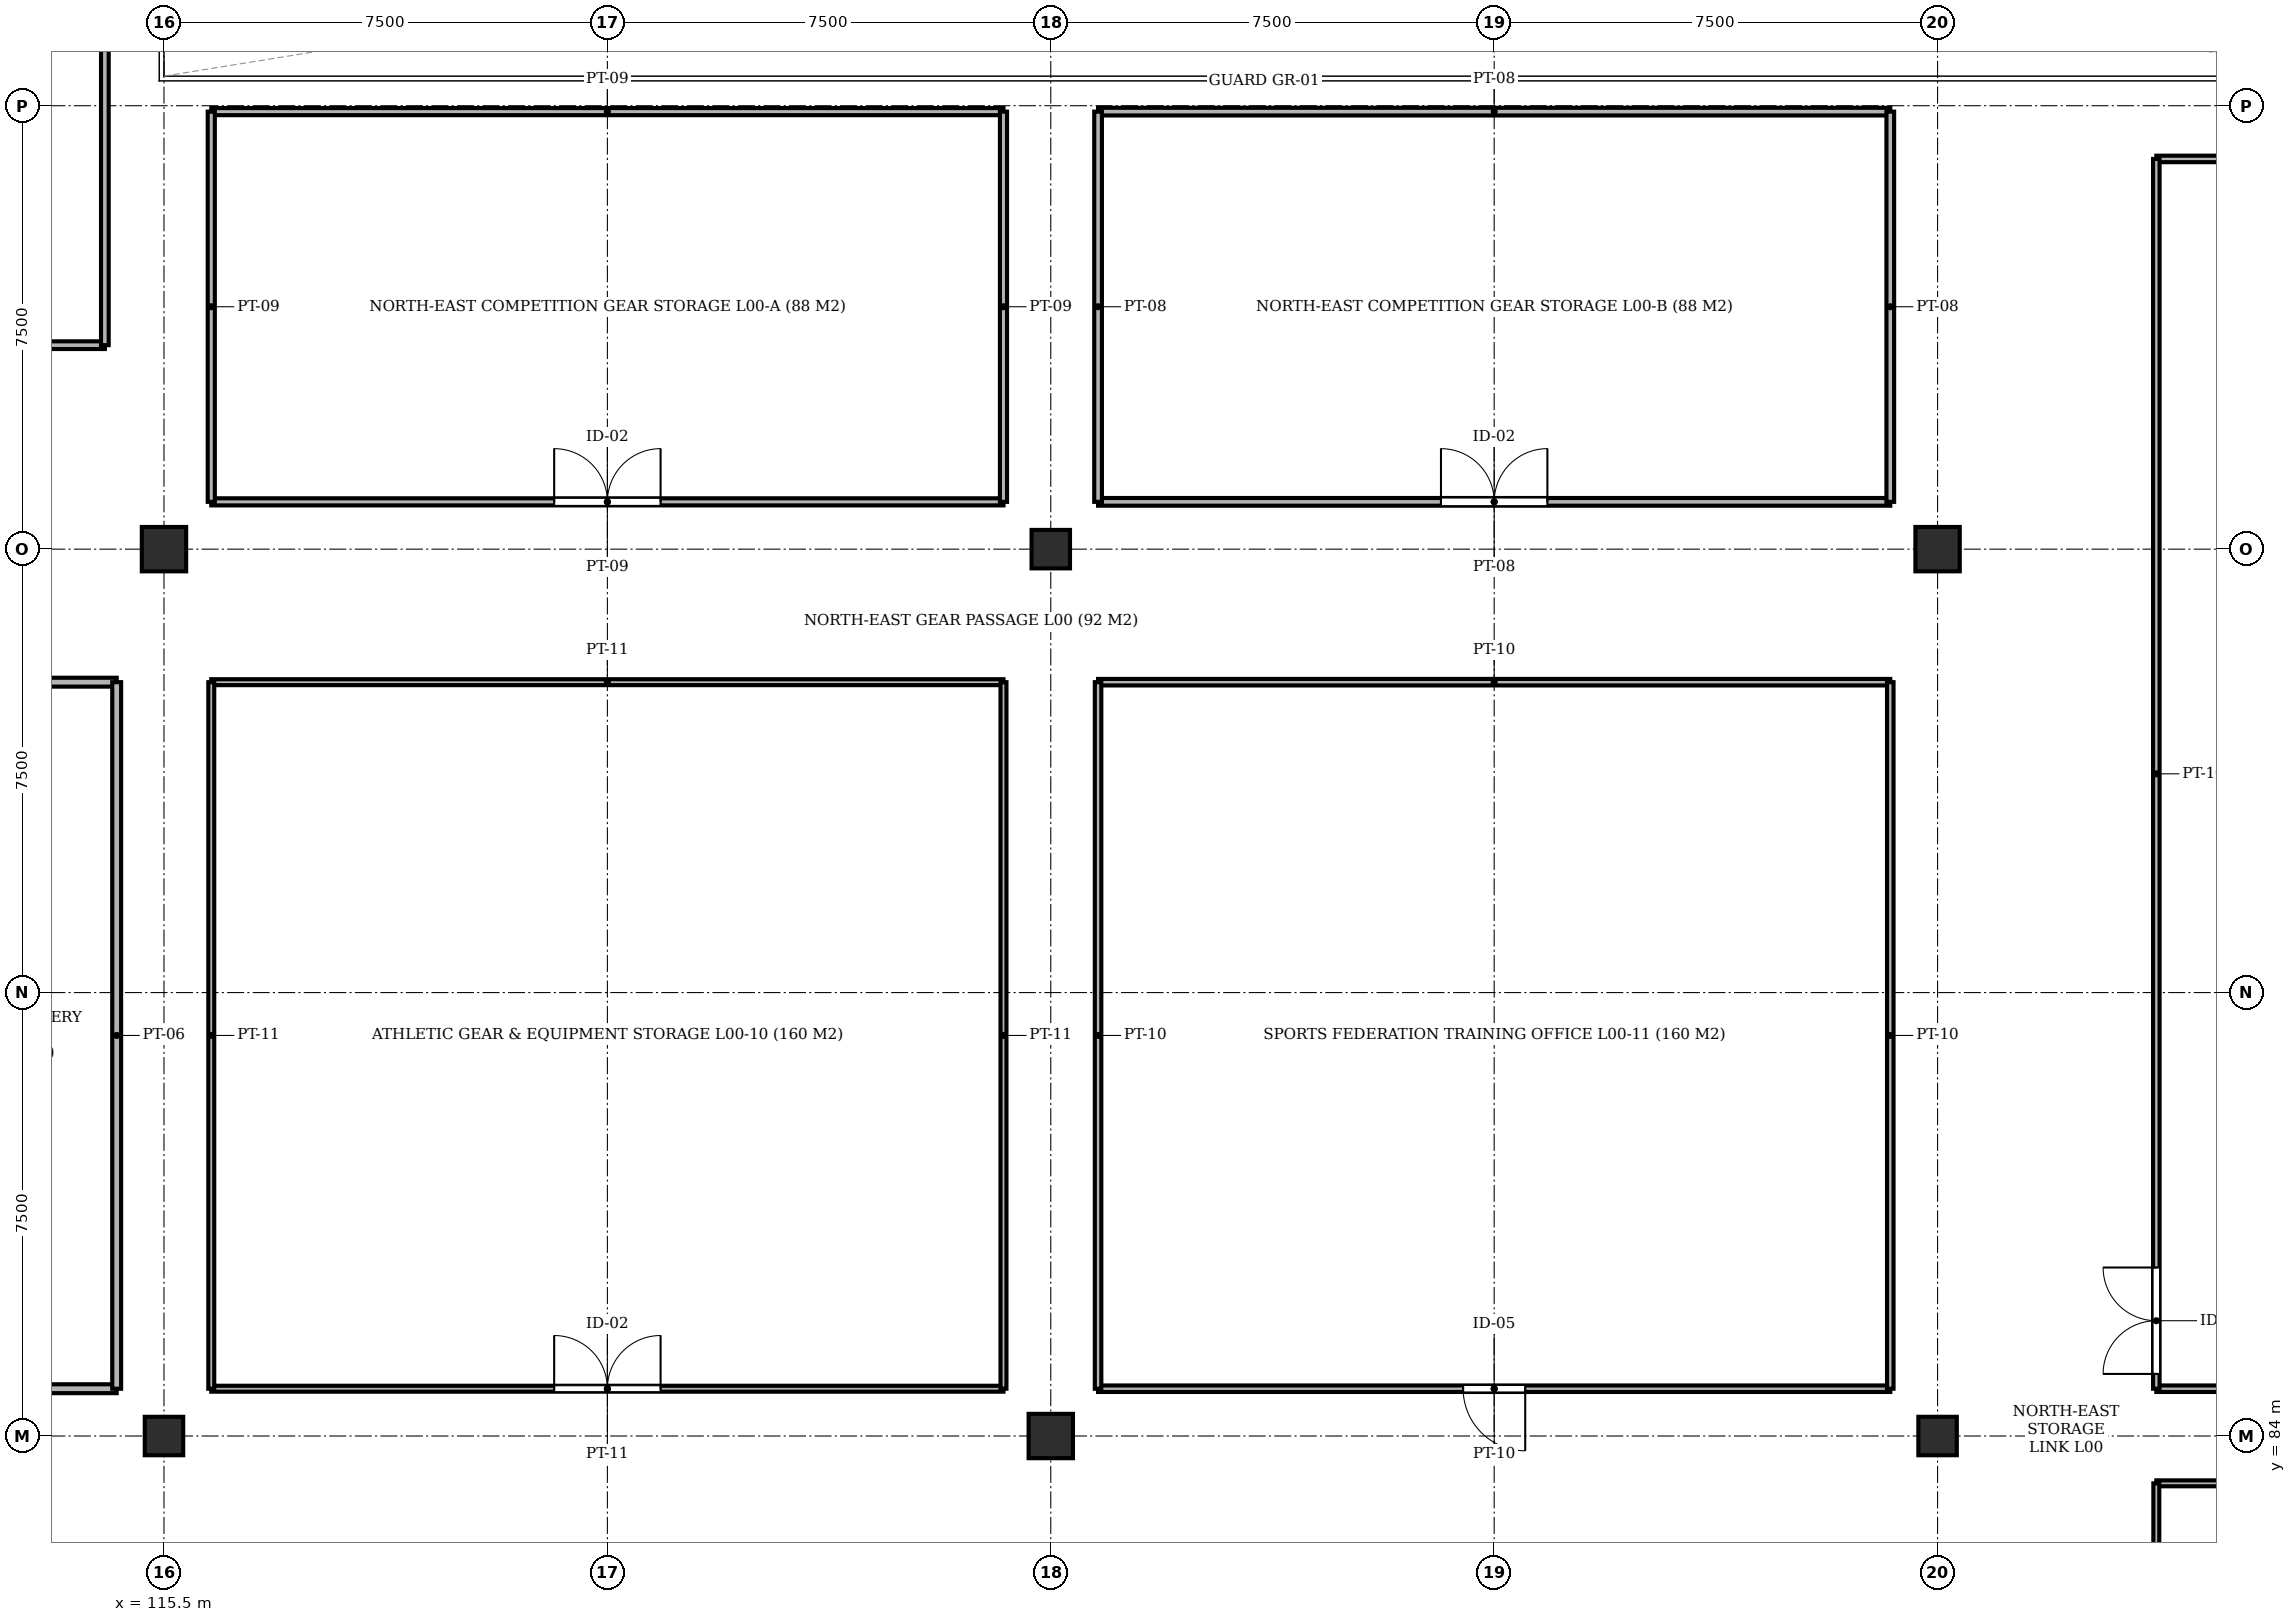
"""IFC4 building model, lengths in metres.
Left out: names, types, materials, properties, quantities, classifications, styles, units other than length and angle.
Written with IfcOpenShell. Run it as: python <this file> out.ifc"""

import sys

from ifc_helpers import new_model, si_unit, direction, frame, frame_2d, origin, origin_2d, place, context, subcontext, project, spatial, rectangle, extrude, element, fill, save


model = new_model("IFC4")
c1 = context("Model", 3, precision=1e-05, world=origin(), true_north=direction((0.0, 1.0)))
c2 = subcontext(c1, "Body", "Model", "MODEL_VIEW")
j1 = project(units=[si_unit("LENGTHUNIT", "METRE"), si_unit("PLANEANGLEUNIT", "RADIAN")], contexts=[c1])
p1 = place(None, origin())
s1 = spatial("IfcSite", under=j1, at=p1, CompositionType="ELEMENT")
p2 = place(p1, origin())
s2 = spatial("IfcBuilding", under=s1, at=p2, CompositionType="ELEMENT")
p3 = place(p2, origin())
s3 = spatial("IfcBuildingStorey", under=s2, at=p3, CompositionType="ELEMENT", Elevation=0.0)
p4 = place(p3, frame((115.5, 84.0, -0.35), z_axis=(0.0, 0.0, 1.0), x_axis=(1.0, 0.0, 0.0)))
e1 = element("IfcColumn", 1, at=p4, inside=s3, PredefinedType="COLUMN", context=c2, shape_type="SweptSolid", body=[
    extrude(rectangle(XDim=0.65, YDim=0.65, at=origin_2d()), origin(), (0.0, 0.0, 1.0), 4.65),
])
for number, where, z_axis, x_axis in (
    (2, (115.5, 99.0, -0.35), (0.0, 0.0, 1.0), (1.0, 0.0, 0.0)),
    (3, (130.5, 84.0, -0.35), (0.0, 0.0, 1.0), (1.0, 0.0, 0.0)),
):
    element("IfcColumn", number, at=place(p3, frame(where, z_axis=z_axis, x_axis=x_axis)), inside=s3, PredefinedType="COLUMN", context=c2, shape_type="SweptSolid", body=[
        extrude(rectangle(XDim=0.75, YDim=0.75, at=origin_2d()), origin(), (0.0, 0.0, 1.0), 4.65),
    ])
for number, where, z_axis, x_axis in (
    (4, (130.5, 99.0, -0.35), (0.0, 0.0, 1.0), (1.0, 0.0, 0.0)),
    (5, (145.5, 84.0, -0.35), (0.0, 0.0, 1.0), (1.0, 0.0, 0.0)),
):
    element("IfcColumn", number, at=place(p3, frame(where, z_axis=z_axis, x_axis=x_axis)), inside=s3, PredefinedType="COLUMN", context=c2, shape_type="SweptSolid", body=[
        extrude(rectangle(XDim=0.65, YDim=0.65, at=origin_2d()), origin(), (0.0, 0.0, 1.0), 4.65),
    ])
p5 = place(p3, frame((145.5, 99.0, -0.35), z_axis=(0.0, 0.0, 1.0), x_axis=(1.0, 0.0, 0.0)))
e6 = element("IfcColumn", 6, at=p5, inside=s3, PredefinedType="COLUMN", context=c2, shape_type="SweptSolid", body=[
    extrude(rectangle(XDim=0.75, YDim=0.75, at=origin_2d()), origin(), (0.0, 0.0, 1.0), 4.65),
])
p6 = place(p3, frame((108.8, 84.8, 0.0), z_axis=(0.0, 0.0, 1.0), x_axis=(1.0, 0.0, 0.0)))
e7 = element("IfcWall", 7, at=p6, inside=s3, PredefinedType="PARTITIONING", context=c2, shape_type="SweptSolid", body=[
    extrude(rectangle(XDim=5.9, YDim=0.15, at=frame_2d((2.95, 0.0))), origin(), (0.0, 0.0, 1.0), 3.88),
])
p7 = place(p6, frame((2.4, 0.0, 0.0)))
e8 = element("IfcOpeningElement", 8, at=p7, cuts=e7, PredefinedType="OPENING", context=c2, shape_type="SweptSolid", body=[
    extrude(rectangle(XDim=1.1, YDim=2.15, at=frame_2d((0.55, 1.075))), frame((0.0, 0.087, 0.0), z_axis=(0.0, -1.0, 0.0), x_axis=(1.0, 0.0, 0.0)), (0.0, 0.0, 1.0), 0.174),
])
p8 = place(p3, frame((108.8, 96.75, 0.0), z_axis=(0.0, 0.0, 1.0), x_axis=(1.0, 0.0, 0.0)))
e9 = element("IfcWall", 9, at=p8, inside=s3, PredefinedType="PARTITIONING", context=c2, shape_type="SweptSolid", body=[
    extrude(rectangle(XDim=5.9, YDim=0.15, at=frame_2d((2.95, 0.0))), origin(), (0.0, 0.0, 1.0), 3.88),
])
p9 = place(p3, frame((114.7, 84.8, 0.0), z_axis=(0.0, 0.0, 1.0), x_axis=(0.0, 1.0, 0.0)))
e10 = element("IfcWall", 10, at=p9, inside=s3, PredefinedType="PARTITIONING", context=c2, shape_type="SweptSolid", body=[
    extrude(rectangle(XDim=11.95, YDim=0.15, at=frame_2d((5.975, 0.0))), origin(), (0.0, 0.0, 1.0), 3.88),
])
p10 = place(p3, frame((116.3, 84.8, 0.0), z_axis=(0.0, 0.0, 1.0), x_axis=(1.0, 0.0, 0.0)))
e11 = element("IfcWall", 11, at=p10, inside=s3, PredefinedType="PARTITIONING", context=c2, shape_type="SweptSolid", body=[
    extrude(rectangle(XDim=13.4, YDim=0.1, at=frame_2d((6.7, 0.0))), origin(), (0.0, 0.0, 1.0), 3.88),
])
p11 = place(p10, frame((5.8, 0.0, 0.0)))
e12 = element("IfcOpeningElement", 12, at=p11, cuts=e11, PredefinedType="OPENING", context=c2, shape_type="SweptSolid", body=[
    extrude(rectangle(XDim=1.8, YDim=2.25, at=frame_2d((0.9, 1.125))), frame((0.0, 0.062, 0.0), z_axis=(0.0, -1.0, 0.0), x_axis=(1.0, 0.0, 0.0)), (0.0, 0.0, 1.0), 0.124),
])
p12 = place(p3, frame((116.3, 96.75, 0.0), z_axis=(0.0, 0.0, 1.0), x_axis=(1.0, 0.0, 0.0)))
e13 = element("IfcWall", 13, at=p12, inside=s3, PredefinedType="PARTITIONING", context=c2, shape_type="SweptSolid", body=[
    extrude(rectangle(XDim=13.4, YDim=0.1, at=frame_2d((6.7, 0.0))), origin(), (0.0, 0.0, 1.0), 3.88),
])
for number, where, z_axis, x_axis in (
    (14, (116.3, 84.8, 0.0), (0.0, 0.0, 1.0), (0.0, 1.0, 0.0)),
    (15, (129.7, 84.8, 0.0), (0.0, 0.0, 1.0), (0.0, 1.0, 0.0)),
):
    element("IfcWall", number, at=place(p3, frame(where, z_axis=z_axis, x_axis=x_axis)), inside=s3, PredefinedType="PARTITIONING", context=c2, shape_type="SweptSolid", body=[
        extrude(rectangle(XDim=11.95, YDim=0.1, at=frame_2d((5.975, 0.0))), origin(), (0.0, 0.0, 1.0), 3.88),
    ])
p13 = place(p3, frame((131.3, 84.8, 0.0), z_axis=(0.0, 0.0, 1.0), x_axis=(1.0, 0.0, 0.0)))
e16 = element("IfcWall", 16, at=p13, inside=s3, PredefinedType="PARTITIONING", context=c2, shape_type="SweptSolid", body=[
    extrude(rectangle(XDim=13.4, YDim=0.11, at=frame_2d((6.7, 0.0))), origin(), (0.0, 0.0, 1.0), 3.88),
])
p14 = place(p13, frame((6.175, 0.0, 0.0)))
e17 = element("IfcOpeningElement", 17, at=p14, cuts=e16, PredefinedType="OPENING", context=c2, shape_type="SweptSolid", body=[
    extrude(rectangle(XDim=1.05, YDim=2.15, at=frame_2d((0.525, 1.075))), frame((0.0, 0.067, 0.0), z_axis=(0.0, -1.0, 0.0), x_axis=(1.0, 0.0, 0.0)), (0.0, 0.0, 1.0), 0.134),
])
p15 = place(p3, frame((131.3, 96.75, 0.0), z_axis=(0.0, 0.0, 1.0), x_axis=(1.0, 0.0, 0.0)))
e18 = element("IfcWall", 18, at=p15, inside=s3, PredefinedType="PARTITIONING", context=c2, shape_type="SweptSolid", body=[
    extrude(rectangle(XDim=13.4, YDim=0.11, at=frame_2d((6.7, 0.0))), origin(), (0.0, 0.0, 1.0), 3.88),
])
for number, where, z_axis, x_axis in (
    (19, (131.3, 84.8, 0.0), (0.0, 0.0, 1.0), (0.0, 1.0, 0.0)),
    (20, (144.7, 84.8, 0.0), (0.0, 0.0, 1.0), (0.0, 1.0, 0.0)),
):
    element("IfcWall", number, at=place(p3, frame(where, z_axis=z_axis, x_axis=x_axis)), inside=s3, PredefinedType="PARTITIONING", context=c2, shape_type="SweptSolid", body=[
        extrude(rectangle(XDim=11.95, YDim=0.11, at=frame_2d((5.975, 0.0))), origin(), (0.0, 0.0, 1.0), 3.88),
    ])
p16 = place(p3, frame((108.8, 102.45, 0.0), z_axis=(0.0, 0.0, 1.0), x_axis=(1.0, 0.0, 0.0)))
e21 = element("IfcWall", 21, at=p16, inside=s3, PredefinedType="PARTITIONING", context=c2, shape_type="SweptSolid", body=[
    extrude(rectangle(XDim=5.7, YDim=0.13, at=frame_2d((2.85, 0.0))), origin(), (0.0, 0.0, 1.0), 3.88),
])
p17 = place(p16, frame((1.95, 0.0, 0.0)))
e22 = element("IfcOpeningElement", 22, at=p17, cuts=e21, PredefinedType="OPENING", context=c2, shape_type="SweptSolid", body=[
    extrude(rectangle(XDim=1.8, YDim=2.25, at=frame_2d((0.9, 1.125))), frame((0.0, 0.077, 0.0), z_axis=(0.0, -1.0, 0.0), x_axis=(1.0, 0.0, 0.0)), (0.0, 0.0, 1.0), 0.154),
])
p18 = place(p3, frame((114.5, 102.45, 0.0), z_axis=(0.0, 0.0, 1.0), x_axis=(0.0, 1.0, 0.0)))
e23 = element("IfcWall", 23, at=p18, inside=s3, PredefinedType="PARTITIONING", context=c2, shape_type="SweptSolid", body=[
    extrude(rectangle(XDim=10.65, YDim=0.13, at=frame_2d((5.325, 0.0))), origin(), (0.0, 0.0, 1.0), 3.88),
])
p19 = place(p3, frame((149.2, 83.2, 0.0), z_axis=(0.0, 0.0, 1.0), x_axis=(1.0, 0.0, 0.0)))
e24 = element("IfcWall", 24, at=p19, inside=s3, PredefinedType="PARTITIONING", context=c2, shape_type="SweptSolid", body=[
    extrude(rectangle(XDim=14.6, YDim=0.1, at=frame_2d((7.3, 0.0))), origin(), (0.0, 0.0, 1.0), 3.88),
])
p20 = place(p3, frame((149.2, 70.4, 0.0), z_axis=(0.0, 0.0, 1.0), x_axis=(0.0, 1.0, 0.0)))
e25 = element("IfcWall", 25, at=p20, inside=s3, PredefinedType="PARTITIONING", context=c2, shape_type="SweptSolid", body=[
    extrude(rectangle(XDim=12.8, YDim=0.1, at=frame_2d((6.4, 0.0))), origin(), (0.0, 0.0, 1.0), 3.88),
])
p21 = place(p20, frame((5.5, 0.0, 0.0)))
e26 = element("IfcOpeningElement", 26, at=p21, cuts=e25, PredefinedType="OPENING", context=c2, shape_type="SweptSolid", body=[
    extrude(rectangle(XDim=1.8, YDim=2.25, at=frame_2d((0.9, 1.125))), frame((0.0, 0.062, 0.0), z_axis=(0.0, -1.0, 0.0), x_axis=(1.0, 0.0, 0.0)), (0.0, 0.0, 1.0), 0.124),
])
for number, where, z_axis, x_axis in (
    (27, (149.2, 84.8, 0.0), (0.0, 0.0, 1.0), (1.0, 0.0, 0.0)),
    (28, (149.2, 105.6, 0.0), (0.0, 0.0, 1.0), (1.0, 0.0, 0.0)),
):
    element("IfcWall", number, at=place(p3, frame(where, z_axis=z_axis, x_axis=x_axis)), inside=s3, PredefinedType="PARTITIONING", context=c2, shape_type="SweptSolid", body=[
        extrude(rectangle(XDim=14.6, YDim=0.11, at=frame_2d((7.3, 0.0))), origin(), (0.0, 0.0, 1.0), 3.88),
    ])
p22 = place(p3, frame((149.2, 84.8, 0.0), z_axis=(0.0, 0.0, 1.0), x_axis=(0.0, 1.0, 0.0)))
e29 = element("IfcWall", 29, at=p22, inside=s3, PredefinedType="PARTITIONING", context=c2, shape_type="SweptSolid", body=[
    extrude(rectangle(XDim=20.8, YDim=0.11, at=frame_2d((10.4, 0.0))), origin(), (0.0, 0.0, 1.0), 3.88),
])
p23 = place(p22, frame((0.25, 0.0, 0.0)))
e30 = element("IfcOpeningElement", 30, at=p23, cuts=e29, PredefinedType="OPENING", context=c2, shape_type="SweptSolid", body=[
    extrude(rectangle(XDim=1.8, YDim=2.25, at=frame_2d((0.9, 1.125))), frame((0.0, 0.067, 0.0), z_axis=(0.0, -1.0, 0.0), x_axis=(1.0, 0.0, 0.0)), (0.0, 0.0, 1.0), 0.134),
])
p24 = place(p3, frame((116.3, 99.8, 0.0), z_axis=(0.0, 0.0, 1.0), x_axis=(1.0, 0.0, 0.0)))
e31 = element("IfcWall", 31, at=p24, inside=s3, PredefinedType="PARTITIONING", context=c2, shape_type="SweptSolid", body=[
    extrude(rectangle(XDim=13.4, YDim=0.12, at=frame_2d((6.7, 0.0))), origin(), (0.0, 0.0, 1.0), 3.88),
])
p25 = place(p24, frame((5.8, 0.0, 0.0)))
e32 = element("IfcOpeningElement", 32, at=p25, cuts=e31, PredefinedType="OPENING", context=c2, shape_type="SweptSolid", body=[
    extrude(rectangle(XDim=1.8, YDim=2.25, at=frame_2d((0.9, 1.125))), frame((0.0, 0.072, 0.0), z_axis=(0.0, -1.0, 0.0), x_axis=(1.0, 0.0, 0.0)), (0.0, 0.0, 1.0), 0.144),
])
p26 = place(p3, frame((116.3, 106.4, 0.0), z_axis=(0.0, 0.0, 1.0), x_axis=(1.0, 0.0, 0.0)))
e33 = element("IfcWall", 33, at=p26, inside=s3, PredefinedType="PARTITIONING", context=c2, shape_type="SweptSolid", body=[
    extrude(rectangle(XDim=13.4, YDim=0.12, at=frame_2d((6.7, 0.0))), origin(), (0.0, 0.0, 1.0), 3.88),
])
for number, where, z_axis, x_axis in (
    (34, (116.3, 99.8, 0.0), (0.0, 0.0, 1.0), (0.0, 1.0, 0.0)),
    (35, (129.7, 99.8, 0.0), (0.0, 0.0, 1.0), (0.0, 1.0, 0.0)),
):
    element("IfcWall", number, at=place(p3, frame(where, z_axis=z_axis, x_axis=x_axis)), inside=s3, PredefinedType="PARTITIONING", context=c2, shape_type="SweptSolid", body=[
        extrude(rectangle(XDim=6.6, YDim=0.12, at=frame_2d((3.3, 0.0))), origin(), (0.0, 0.0, 1.0), 3.88),
    ])
p27 = place(p3, frame((131.3, 99.8, 0.0), z_axis=(0.0, 0.0, 1.0), x_axis=(1.0, 0.0, 0.0)))
e36 = element("IfcWall", 36, at=p27, inside=s3, PredefinedType="PARTITIONING", context=c2, shape_type="SweptSolid", body=[
    extrude(rectangle(XDim=13.4, YDim=0.13, at=frame_2d((6.7, 0.0))), origin(), (0.0, 0.0, 1.0), 3.88),
])
p28 = place(p27, frame((5.8, 0.0, 0.0)))
e37 = element("IfcOpeningElement", 37, at=p28, cuts=e36, PredefinedType="OPENING", context=c2, shape_type="SweptSolid", body=[
    extrude(rectangle(XDim=1.8, YDim=2.25, at=frame_2d((0.9, 1.125))), frame((0.0, 0.077, 0.0), z_axis=(0.0, -1.0, 0.0), x_axis=(1.0, 0.0, 0.0)), (0.0, 0.0, 1.0), 0.154),
])
p29 = place(p3, frame((131.3, 106.4, 0.0), z_axis=(0.0, 0.0, 1.0), x_axis=(1.0, 0.0, 0.0)))
e38 = element("IfcWall", 38, at=p29, inside=s3, PredefinedType="PARTITIONING", context=c2, shape_type="SweptSolid", body=[
    extrude(rectangle(XDim=13.4, YDim=0.13, at=frame_2d((6.7, 0.0))), origin(), (0.0, 0.0, 1.0), 3.88),
])
for number, where, z_axis, x_axis in (
    (39, (131.3, 99.8, 0.0), (0.0, 0.0, 1.0), (0.0, 1.0, 0.0)),
    (40, (144.7, 99.8, 0.0), (0.0, 0.0, 1.0), (0.0, 1.0, 0.0)),
):
    element("IfcWall", number, at=place(p3, frame(where, z_axis=z_axis, x_axis=x_axis)), inside=s3, PredefinedType="PARTITIONING", context=c2, shape_type="SweptSolid", body=[
        extrude(rectangle(XDim=6.6, YDim=0.13, at=frame_2d((3.3, 0.0))), origin(), (0.0, 0.0, 1.0), 3.88),
    ])
p30 = place(p11, origin())
e41 = element("IfcDoor", 41, at=p30, inside=s3, OperationType="DOUBLE_DOOR_SINGLE_SWING", PredefinedType="DOOR", context=c2, shape_type="SweptSolid", body=[
    extrude(rectangle(XDim=1.8, YDim=2.25, at=frame_2d((0.9, 1.125))), frame((0.0, 0.025, 0.0), z_axis=(0.0, -1.0, 0.0), x_axis=(1.0, 0.0, 0.0)), (0.0, 0.0, 1.0), 0.05),
])
fill(e12, e41)
p31 = place(p14, frame((1.05, 0.0, 0.0), z_axis=(0.0, 0.0, 1.0), x_axis=(-1.0, 0.0, 0.0)))
e42 = element("IfcDoor", 42, at=p31, inside=s3, OperationType="SINGLE_SWING_RIGHT", PredefinedType="DOOR", context=c2, shape_type="SweptSolid", body=[
    extrude(rectangle(XDim=1.05, YDim=2.15, at=frame_2d((0.525, 1.075))), frame((0.0, 0.025, 0.0), z_axis=(0.0, -1.0, 0.0), x_axis=(1.0, 0.0, 0.0)), (0.0, 0.0, 1.0), 0.05),
])
fill(e17, e42)
p32 = place(p23, origin())
e43 = element("IfcDoor", 43, at=p32, inside=s3, OperationType="DOUBLE_DOOR_SINGLE_SWING", PredefinedType="DOOR", context=c2, shape_type="SweptSolid", body=[
    extrude(rectangle(XDim=1.8, YDim=2.25, at=frame_2d((0.9, 1.125))), frame((0.0, 0.025, 0.0), z_axis=(0.0, -1.0, 0.0), x_axis=(1.0, 0.0, 0.0)), (0.0, 0.0, 1.0), 0.05),
])
fill(e30, e43)
p33 = place(p25, origin())
e44 = element("IfcDoor", 44, at=p33, inside=s3, OperationType="DOUBLE_DOOR_SINGLE_SWING", PredefinedType="DOOR", context=c2, shape_type="SweptSolid", body=[
    extrude(rectangle(XDim=1.8, YDim=2.25, at=frame_2d((0.9, 1.125))), frame((0.0, 0.025, 0.0), z_axis=(0.0, -1.0, 0.0), x_axis=(1.0, 0.0, 0.0)), (0.0, 0.0, 1.0), 0.05),
])
fill(e32, e44)
p34 = place(p28, origin())
e45 = element("IfcDoor", 45, at=p34, inside=s3, OperationType="DOUBLE_DOOR_SINGLE_SWING", PredefinedType="DOOR", context=c2, shape_type="SweptSolid", body=[
    extrude(rectangle(XDim=1.8, YDim=2.25, at=frame_2d((0.9, 1.125))), frame((0.0, 0.025, 0.0), z_axis=(0.0, -1.0, 0.0), x_axis=(1.0, 0.0, 0.0)), (0.0, 0.0, 1.0), 0.05),
])
fill(e37, e45)
save(model, sys.argv[1])
